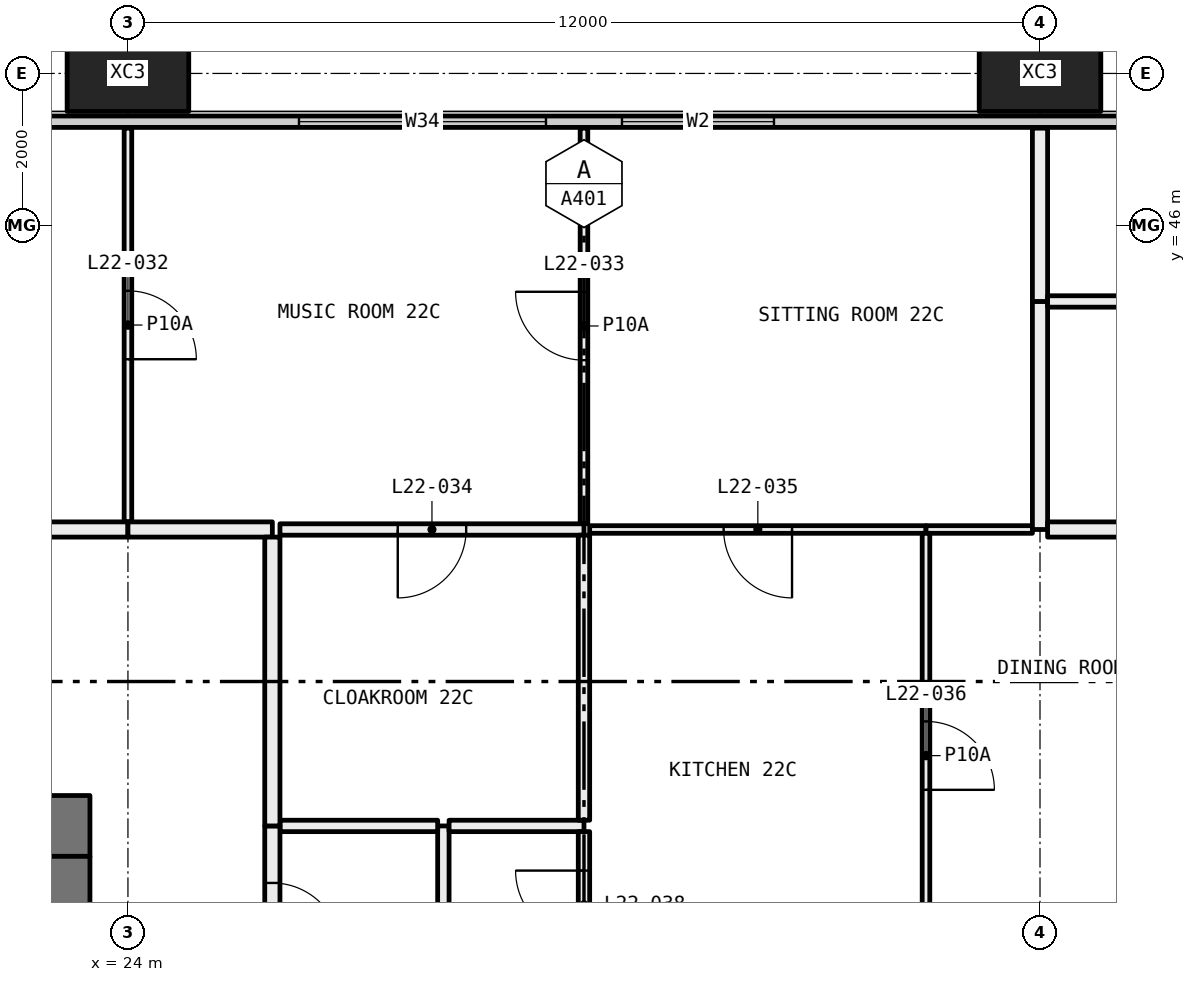
"""IFC4 building model, lengths in metres.
Left out: names, types, materials, properties, quantities, classifications, styles, units other than length and angle.
Written with IfcOpenShell. Run it as: python <this file> out.ifc"""

import sys

from ifc_helpers import new_model, si_unit, direction, frame, frame_2d, origin, origin_2d, place, context, subcontext, project, spatial, rectangle, hollow_rectangle, extrude, element, fill, save


model = new_model("IFC4")
c1 = context("Model", 3, precision=1e-05, world=origin(), true_north=direction((0.0, 1.0)))
c2 = subcontext(c1, "Body", "Model", "MODEL_VIEW")
j1 = project(units=[si_unit("LENGTHUNIT", "METRE"), si_unit("PLANEANGLEUNIT", "RADIAN")], contexts=[c1])
p1 = place(None, origin())
s1 = spatial("IfcSite", under=j1, at=p1, CompositionType="ELEMENT")
p2 = place(p1, origin())
s2 = spatial("IfcBuilding", under=s1, at=p2, CompositionType="ELEMENT")
p3 = place(p2, frame((0.0, 0.0, 88.65)))
s3 = spatial("IfcBuildingStorey", under=s2, at=p3, CompositionType="ELEMENT", Elevation=88.65)
for number, where, z_axis, x_axis in (
    (1, (24.0, 48.0, -0.4), (0.0, 0.0, 1.0), (1.0, 0.0, 0.0)),
    (2, (36.0, 48.0, -0.4), (0.0, 0.0, 1.0), (1.0, 0.0, 0.0)),
):
    element("IfcColumn", number, at=place(p3, frame(where, z_axis=z_axis, x_axis=x_axis)), inside=s3, PredefinedType="COLUMN", context=c2, shape_type="SweptSolid", body=[
        extrude(hollow_rectangle(XDim=1.6, YDim=1.0, WallThickness=0.065, at=origin_2d()), origin(), (0.0, 0.0, 1.0), 3.45),
    ])
p4 = place(p3, frame((6.56, 47.365, 0.0), z_axis=(0.0, 0.0, 1.0), x_axis=(1.0, 0.0, 0.0)))
e3 = element("IfcWall", 3, at=p4, inside=s3, PredefinedType="ELEMENTEDWALL", context=c2, shape_type="SweptSolid", body=[
    extrude(rectangle(XDim=58.88, YDim=0.15, at=frame_2d((29.44, 0.0))), origin(), (0.0, 0.0, 1.0), 3.05),
])
p5 = place(p4, frame((0.44, 0.0, 0.45)))
e4 = element("IfcOpeningElement", 4, at=p5, cuts=e3, PredefinedType="OPENING", context=c2, shape_type="SweptSolid", body=[
    extrude(rectangle(XDim=4.5, YDim=2.55, at=frame_2d((2.25, 1.275))), frame((0.0, 0.085, 0.0), z_axis=(0.0, -1.0, 0.0), x_axis=(1.0, 0.0, 0.0)), (0.0, 0.0, 1.0), 0.17),
])
p6 = place(p4, frame((7.69, 0.0, 0.45)))
e5 = element("IfcOpeningElement", 5, at=p6, cuts=e3, PredefinedType="OPENING", context=c2, shape_type="SweptSolid", body=[
    extrude(rectangle(XDim=3.25, YDim=2.55, at=frame_2d((1.625, 1.275))), frame((0.0, 0.085, 0.0), z_axis=(0.0, -1.0, 0.0), x_axis=(1.0, 0.0, 0.0)), (0.0, 0.0, 1.0), 0.17),
])
p7 = place(p4, frame((11.94, 0.0, 0.45)))
e6 = element("IfcOpeningElement", 6, at=p7, cuts=e3, PredefinedType="OPENING", context=c2, shape_type="SweptSolid", body=[
    extrude(rectangle(XDim=3.25, YDim=2.55, at=frame_2d((1.625, 1.275))), frame((0.0, 0.085, 0.0), z_axis=(0.0, -1.0, 0.0), x_axis=(1.0, 0.0, 0.0)), (0.0, 0.0, 1.0), 0.17),
])
p8 = place(p4, frame((19.69, 0.0, 0.45)))
e7 = element("IfcOpeningElement", 7, at=p8, cuts=e3, PredefinedType="OPENING", context=c2, shape_type="SweptSolid", body=[
    extrude(rectangle(XDim=3.25, YDim=2.55, at=frame_2d((1.625, 1.275))), frame((0.0, 0.085, 0.0), z_axis=(0.0, -1.0, 0.0), x_axis=(1.0, 0.0, 0.0)), (0.0, 0.0, 1.0), 0.17),
])
p9 = place(p4, frame((23.94, 0.0, 0.45)))
e8 = element("IfcOpeningElement", 8, at=p9, cuts=e3, PredefinedType="OPENING", context=c2, shape_type="SweptSolid", body=[
    extrude(rectangle(XDim=2.0, YDim=2.55, at=frame_2d((1.0, 1.275))), frame((0.0, 0.085, 0.0), z_axis=(0.0, -1.0, 0.0), x_axis=(1.0, 0.0, 0.0)), (0.0, 0.0, 1.0), 0.17),
])
p10 = place(p4, frame((31.69, 0.0, 0.45)))
e9 = element("IfcOpeningElement", 9, at=p10, cuts=e3, PredefinedType="OPENING", context=c2, shape_type="SweptSolid", body=[
    extrude(rectangle(XDim=3.25, YDim=2.55, at=frame_2d((1.625, 1.275))), frame((0.0, 0.085, 0.0), z_axis=(0.0, -1.0, 0.0), x_axis=(1.0, 0.0, 0.0)), (0.0, 0.0, 1.0), 0.17),
])
p11 = place(p4, frame((35.94, 0.0, 0.45)))
e10 = element("IfcOpeningElement", 10, at=p11, cuts=e3, PredefinedType="OPENING", context=c2, shape_type="SweptSolid", body=[
    extrude(rectangle(XDim=3.25, YDim=2.55, at=frame_2d((1.625, 1.275))), frame((0.0, 0.085, 0.0), z_axis=(0.0, -1.0, 0.0), x_axis=(1.0, 0.0, 0.0)), (0.0, 0.0, 1.0), 0.17),
])
p12 = place(p4, frame((43.69, 0.0, 0.45)))
e11 = element("IfcOpeningElement", 11, at=p12, cuts=e3, PredefinedType="OPENING", context=c2, shape_type="SweptSolid", body=[
    extrude(rectangle(XDim=3.25, YDim=2.55, at=frame_2d((1.625, 1.275))), frame((0.0, 0.085, 0.0), z_axis=(0.0, -1.0, 0.0), x_axis=(1.0, 0.0, 0.0)), (0.0, 0.0, 1.0), 0.17),
])
p13 = place(p4, frame((47.94, 0.0, 0.45)))
e12 = element("IfcOpeningElement", 12, at=p13, cuts=e3, PredefinedType="OPENING", context=c2, shape_type="SweptSolid", body=[
    extrude(rectangle(XDim=2.0, YDim=2.55, at=frame_2d((1.0, 1.275))), frame((0.0, 0.085, 0.0), z_axis=(0.0, -1.0, 0.0), x_axis=(1.0, 0.0, 0.0)), (0.0, 0.0, 1.0), 0.17),
])
p14 = place(p4, frame((53.94, 0.0, 0.45)))
e13 = element("IfcOpeningElement", 13, at=p14, cuts=e3, PredefinedType="OPENING", context=c2, shape_type="SweptSolid", body=[
    extrude(rectangle(XDim=4.5, YDim=2.55, at=frame_2d((2.25, 1.275))), frame((0.0, 0.085, 0.0), z_axis=(0.0, -1.0, 0.0), x_axis=(1.0, 0.0, 0.0)), (0.0, 0.0, 1.0), 0.17),
])
p15 = place(p3, frame((24.0, 42.1, 0.0), z_axis=(0.0, 0.0, 1.0), x_axis=(0.0, 1.0, 0.0)))
e14 = element("IfcWall", 14, at=p15, inside=s3, PredefinedType="PARTITIONING", context=c2, shape_type="SweptSolid", body=[
    extrude(rectangle(XDim=5.18, YDim=0.1, at=frame_2d((2.59, 0.0))), origin(), (0.0, 0.0, 1.0), 3.05),
])
p16 = place(p15, frame((2.14, 0.0, 0.0)))
e15 = element("IfcOpeningElement", 15, at=p16, cuts=e14, PredefinedType="OPENING", context=c2, shape_type="SweptSolid", body=[
    extrude(rectangle(XDim=0.9, YDim=2.1, at=frame_2d((0.45, 1.05))), frame((0.0, 0.06, 0.0), z_axis=(0.0, -1.0, 0.0), x_axis=(1.0, 0.0, 0.0)), (0.0, 0.0, 1.0), 0.12),
])
p17 = place(p3, frame((18.0, 42.0, 0.0), z_axis=(0.0, 0.0, 1.0), x_axis=(1.0, 0.0, 0.0)))
e16 = element("IfcWall", 16, at=p17, inside=s3, PredefinedType="PARTITIONING", context=c2, shape_type="SweptSolid", body=[
    extrude(rectangle(XDim=6.0, YDim=0.2, at=frame_2d((3.0, 0.0))), origin(), (0.0, 0.0, 1.0), 3.05),
])
p18 = place(p17, frame((2.5, 0.0, 0.0)))
e17 = element("IfcOpeningElement", 17, at=p18, cuts=e16, PredefinedType="OPENING", context=c2, shape_type="SweptSolid", body=[
    extrude(rectangle(XDim=1.0, YDim=2.1, at=frame_2d((0.5, 1.05))), frame((0.0, 0.11, 0.0), z_axis=(0.0, -1.0, 0.0), x_axis=(1.0, 0.0, 0.0)), (0.0, 0.0, 1.0), 0.22),
])
p19 = place(p3, frame((30.0, 42.075, 0.0), z_axis=(0.0, 0.0, 1.0), x_axis=(0.0, 1.0, 0.0)))
e18 = element("IfcWall", 18, at=p19, inside=s3, PredefinedType="PARTITIONING", context=c2, shape_type="SweptSolid", body=[
    extrude(rectangle(XDim=5.205, YDim=0.1, at=frame_2d((2.603, 0.0))), origin(), (0.0, 0.0, 1.0), 3.05),
])
p20 = place(p19, frame((2.153, 0.0, 0.0)))
e19 = element("IfcOpeningElement", 19, at=p20, cuts=e18, PredefinedType="OPENING", context=c2, shape_type="SweptSolid", body=[
    extrude(rectangle(XDim=0.9, YDim=2.1, at=frame_2d((0.45, 1.05))), frame((0.0, 0.06, 0.0), z_axis=(0.0, -1.0, 0.0), x_axis=(1.0, 0.0, 0.0)), (0.0, 0.0, 1.0), 0.12),
])
p21 = place(p3, frame((26.0, 42.0, 0.0), z_axis=(0.0, 0.0, 1.0), x_axis=(1.0, 0.0, 0.0)))
e20 = element("IfcWall", 20, at=p21, inside=s3, PredefinedType="PARTITIONING", context=c2, shape_type="SweptSolid", body=[
    extrude(rectangle(XDim=4.0, YDim=0.15, at=frame_2d((2.0, 0.0))), origin(), (0.0, 0.0, 1.0), 3.05),
])
p22 = place(p21, frame((1.55, 0.0, 0.0)))
e21 = element("IfcOpeningElement", 21, at=p22, cuts=e20, PredefinedType="OPENING", context=c2, shape_type="SweptSolid", body=[
    extrude(rectangle(XDim=0.9, YDim=2.1, at=frame_2d((0.45, 1.05))), frame((0.0, 0.085, 0.0), z_axis=(0.0, -1.0, 0.0), x_axis=(1.0, 0.0, 0.0)), (0.0, 0.0, 1.0), 0.17),
])
p23 = place(p3, frame((24.0, 42.0, 0.0), z_axis=(0.0, 0.0, 1.0), x_axis=(1.0, 0.0, 0.0)))
e22 = element("IfcWall", 22, at=p23, inside=s3, PredefinedType="PARTITIONING", context=c2, shape_type="SweptSolid", body=[
    extrude(rectangle(XDim=1.9, YDim=0.2, at=frame_2d((0.95, 0.0))), origin(), (0.0, 0.0, 1.0), 3.05),
])
p24 = place(p3, frame((30.075, 42.0, 0.0), z_axis=(0.0, 0.0, 1.0), x_axis=(1.0, 0.0, 0.0)))
e23 = element("IfcWall", 23, at=p24, inside=s3, PredefinedType="PARTITIONING", context=c2, shape_type="SweptSolid", body=[
    extrude(rectangle(XDim=4.425, YDim=0.1, at=frame_2d((2.212, 0.0))), origin(), (0.0, 0.0, 1.0), 3.05),
])
p25 = place(p24, frame((1.762, 0.0, 0.0)))
e24 = element("IfcOpeningElement", 24, at=p25, cuts=e23, PredefinedType="OPENING", context=c2, shape_type="SweptSolid", body=[
    extrude(rectangle(XDim=0.9, YDim=2.1, at=frame_2d((0.45, 1.05))), frame((0.0, 0.06, 0.0), z_axis=(0.0, -1.0, 0.0), x_axis=(1.0, 0.0, 0.0)), (0.0, 0.0, 1.0), 0.12),
])
p26 = place(p3, frame((34.5, 42.0, 0.0), z_axis=(0.0, 0.0, 1.0), x_axis=(1.0, 0.0, 0.0)))
e25 = element("IfcWall", 25, at=p26, inside=s3, PredefinedType="PARTITIONING", context=c2, shape_type="SweptSolid", body=[
    extrude(rectangle(XDim=1.4, YDim=0.1, at=frame_2d((0.7, 0.0))), origin(), (0.0, 0.0, 1.0), 3.05),
])
p27 = place(p3, frame((36.0, 42.0, 0.0), z_axis=(0.0, 0.0, 1.0), x_axis=(0.0, 1.0, 0.0)))
e26 = element("IfcWall", 26, at=p27, inside=s3, PredefinedType="PARTITIONING", context=c2, shape_type="SweptSolid", body=[
    extrude(rectangle(XDim=3.0, YDim=0.2, at=frame_2d((1.5, 0.0))), origin(), (0.0, 0.0, 1.0), 2.45),
])
p28 = place(p3, frame((36.0, 45.0, 0.0), z_axis=(0.0, 0.0, 1.0), x_axis=(0.0, 1.0, 0.0)))
e27 = element("IfcWall", 27, at=p28, inside=s3, PredefinedType="PARTITIONING", context=c2, shape_type="SweptSolid", body=[
    extrude(rectangle(XDim=2.28, YDim=0.2, at=frame_2d((1.14, 0.0))), origin(), (0.0, 0.0, 1.0), 2.45),
])
p29 = place(p3, frame((28.15, 36.1, 0.0), z_axis=(0.0, 0.0, 1.0), x_axis=(0.0, 1.0, 0.0)))
e28 = element("IfcWall", 28, at=p29, inside=s3, PredefinedType="PARTITIONING", context=c2, shape_type="SweptSolid", body=[
    extrude(rectangle(XDim=2.0, YDim=0.15, at=frame_2d((1.0, 0.0))), origin(), (0.0, 0.0, 1.0), 3.05),
])
p30 = place(p3, frame((28.075, 38.1, 0.0), z_axis=(0.0, 0.0, 1.0), x_axis=(-1.0, 0.0, 0.0)))
e29 = element("IfcWall", 29, at=p30, inside=s3, PredefinedType="PARTITIONING", context=c2, shape_type="SweptSolid", body=[
    extrude(rectangle(XDim=2.075, YDim=0.15, at=frame_2d((1.038, 0.0))), origin(), (0.0, 0.0, 1.0), 3.05),
])
p31 = place(p3, frame((25.9, 38.1, 0.0), z_axis=(0.0, 0.0, 1.0), x_axis=(0.0, -1.0, 0.0)))
e30 = element("IfcWall", 30, at=p31, inside=s3, PredefinedType="PARTITIONING", context=c2, shape_type="SweptSolid", body=[
    extrude(rectangle(XDim=2.4, YDim=0.2, at=frame_2d((1.2, 0.0))), origin(), (0.0, 0.0, 1.0), 2.45),
])
p32 = place(p31, frame((0.75, 0.0, 0.0)))
e31 = element("IfcOpeningElement", 31, at=p32, cuts=e30, PredefinedType="OPENING", context=c2, shape_type="SweptSolid", body=[
    extrude(rectangle(XDim=0.9, YDim=2.1, at=frame_2d((0.45, 1.05))), frame((0.0, 0.11, 0.0), z_axis=(0.0, -1.0, 0.0), x_axis=(1.0, 0.0, 0.0)), (0.0, 0.0, 1.0), 0.22),
])
p33 = place(p3, frame((30.0, 38.1, 0.0), z_axis=(0.0, 0.0, 1.0), x_axis=(-1.0, 0.0, 0.0)))
e32 = element("IfcWall", 32, at=p33, inside=s3, PredefinedType="PARTITIONING", context=c2, shape_type="SweptSolid", body=[
    extrude(rectangle(XDim=1.775, YDim=0.15, at=frame_2d((0.887, 0.0))), origin(), (0.0, 0.0, 1.0), 3.05),
])
p34 = place(p3, frame((30.0, 36.1, 0.0), z_axis=(0.0, 0.0, 1.0), x_axis=(0.0, 1.0, 0.0)))
e33 = element("IfcWall", 33, at=p34, inside=s3, PredefinedType="PARTITIONING", context=c2, shape_type="SweptSolid", body=[
    extrude(rectangle(XDim=1.925, YDim=0.15, at=frame_2d((0.962, 0.0))), origin(), (0.0, 0.0, 1.0), 3.05),
])
p35 = place(p34, frame((0.512, 0.0, 0.0)))
e34 = element("IfcOpeningElement", 34, at=p35, cuts=e33, PredefinedType="OPENING", context=c2, shape_type="SweptSolid", body=[
    extrude(rectangle(XDim=0.9, YDim=2.1, at=frame_2d((0.45, 1.05))), frame((0.0, 0.085, 0.0), z_axis=(0.0, -1.0, 0.0), x_axis=(1.0, 0.0, 0.0)), (0.0, 0.0, 1.0), 0.17),
])
p36 = place(p3, frame((30.0, 38.175, 0.0), z_axis=(0.0, 0.0, 1.0), x_axis=(0.0, 1.0, 0.0)))
e35 = element("IfcWall", 35, at=p36, inside=s3, PredefinedType="PARTITIONING", context=c2, shape_type="SweptSolid", body=[
    extrude(rectangle(XDim=3.75, YDim=0.15, at=frame_2d((1.875, 0.0))), origin(), (0.0, 0.0, 1.0), 3.05),
])
p37 = place(p3, frame((25.9, 41.9, 0.0), z_axis=(0.0, 0.0, 1.0), x_axis=(0.0, -1.0, 0.0)))
e36 = element("IfcWall", 36, at=p37, inside=s3, PredefinedType="PARTITIONING", context=c2, shape_type="SweptSolid", body=[
    extrude(rectangle(XDim=3.8, YDim=0.2, at=frame_2d((1.9, 0.0))), origin(), (0.0, 0.0, 1.0), 3.05),
])
p38 = place(p3, frame((34.5, 36.1, 0.0), z_axis=(0.0, 0.0, 1.0), x_axis=(0.0, 1.0, 0.0)))
e37 = element("IfcWall", 37, at=p38, inside=s3, PredefinedType="PARTITIONING", context=c2, shape_type="SweptSolid", body=[
    extrude(rectangle(XDim=5.85, YDim=0.1, at=frame_2d((2.925, 0.0))), origin(), (0.0, 0.0, 1.0), 3.05),
])
p39 = place(p38, frame((2.475, 0.0, 0.0)))
e38 = element("IfcOpeningElement", 38, at=p39, cuts=e37, PredefinedType="OPENING", context=c2, shape_type="SweptSolid", body=[
    extrude(rectangle(XDim=0.9, YDim=2.1, at=frame_2d((0.45, 1.05))), frame((0.0, 0.06, 0.0), z_axis=(0.0, -1.0, 0.0), x_axis=(1.0, 0.0, 0.0)), (0.0, 0.0, 1.0), 0.12),
])
p40 = place(p3, frame((38.4, 42.0, 0.0), z_axis=(0.0, 0.0, 1.0), x_axis=(-1.0, 0.0, 0.0)))
e39 = element("IfcWall", 39, at=p40, inside=s3, PredefinedType="PARTITIONING", context=c2, shape_type="SweptSolid", body=[
    extrude(rectangle(XDim=2.3, YDim=0.2, at=frame_2d((1.15, 0.0))), origin(), (0.0, 0.0, 1.0), 3.05),
])
p41 = place(p3, frame((42.0, 45.0, 0.0), z_axis=(0.0, 0.0, 1.0), x_axis=(-1.0, 0.0, 0.0)))
e40 = element("IfcWall", 40, at=p41, inside=s3, PredefinedType="PARTITIONING", context=c2, shape_type="SweptSolid", body=[
    extrude(rectangle(XDim=5.9, YDim=0.15, at=frame_2d((2.95, 0.0))), origin(), (0.0, 0.0, 1.0), 3.05),
])
p42 = place(p3, frame((12.5, 38.1, 0.0), z_axis=(0.0, 0.0, 1.0), x_axis=(1.0, 0.0, 0.0)))
e41 = element("IfcWall", 41, at=p42, inside=s3, PredefinedType="SHEAR", context=c2, shape_type="SweptSolid", body=[
    extrude(rectangle(XDim=11.0, YDim=0.8, at=frame_2d((5.5, 0.0))), origin(), (0.0, 0.0, 1.0), 3.05),
])
p43 = place(p42, frame((8.4, 0.0, 0.0)))
e42 = element("IfcOpeningElement", 42, at=p43, cuts=e41, PredefinedType="OPENING", context=c2, shape_type="SweptSolid", body=[
    extrude(rectangle(XDim=1.6, YDim=2.1, at=frame_2d((0.8, 1.05))), frame((0.0, 0.41, 0.0), z_axis=(0.0, -1.0, 0.0), x_axis=(1.0, 0.0, 0.0)), (0.0, 0.0, 1.0), 0.82),
])
p44 = place(p3, frame((23.1, 22.3, 0.0), z_axis=(0.0, 0.0, 1.0), x_axis=(0.0, 1.0, 0.0)))
e43 = element("IfcWall", 43, at=p44, inside=s3, PredefinedType="SHEAR", context=c2, shape_type="SweptSolid", body=[
    extrude(rectangle(XDim=15.4, YDim=0.8, at=frame_2d((7.7, 0.0))), origin(), (0.0, 0.0, 1.0), 3.05),
])
p45 = place(p44, frame((6.9, 0.0, 0.0)))
e44 = element("IfcOpeningElement", 44, at=p45, cuts=e43, PredefinedType="OPENING", context=c2, shape_type="SweptSolid", body=[
    extrude(rectangle(XDim=1.6, YDim=2.1, at=frame_2d((0.8, 1.05))), frame((0.0, 0.41, 0.0), z_axis=(0.0, -1.0, 0.0), x_axis=(1.0, 0.0, 0.0)), (0.0, 0.0, 1.0), 0.82),
])
p46 = place(p8, origin())
e45 = element("IfcWindow", 45, at=p46, inside=s3, PartitioningType="SINGLE_PANEL", PredefinedType="WINDOW", context=c2, shape_type="SweptSolid", body=[
    extrude(rectangle(XDim=3.25, YDim=2.55, at=frame_2d((1.625, 1.275))), frame((0.0, 0.03, 0.0), z_axis=(0.0, -1.0, 0.0), x_axis=(1.0, 0.0, 0.0)), (0.0, 0.0, 1.0), 0.06),
])
fill(e7, e45)
p47 = place(p9, origin())
e46 = element("IfcWindow", 46, at=p47, inside=s3, PartitioningType="SINGLE_PANEL", PredefinedType="WINDOW", context=c2, shape_type="SweptSolid", body=[
    extrude(rectangle(XDim=2.0, YDim=2.55, at=frame_2d((1.0, 1.275))), frame((0.0, 0.03, 0.0), z_axis=(0.0, -1.0, 0.0), x_axis=(1.0, 0.0, 0.0)), (0.0, 0.0, 1.0), 0.06),
])
fill(e8, e46)
p48 = place(p16, frame((0.9, 0.0, 0.0), x_axis=(-1.0, 0.0, 0.0)))
e47 = element("IfcDoor", 47, at=p48, inside=s3, OperationType="SINGLE_SWING_LEFT", PredefinedType="DOOR", context=c2, shape_type="SweptSolid", body=[
    extrude(rectangle(XDim=0.9, YDim=2.1, at=frame_2d((0.45, 1.05))), frame((0.0, 0.025, 0.0), z_axis=(0.0, -1.0, 0.0), x_axis=(1.0, 0.0, 0.0)), (0.0, 0.0, 1.0), 0.05),
])
fill(e15, e47)
p49 = place(p20, origin())
e48 = element("IfcDoor", 48, at=p49, inside=s3, OperationType="SINGLE_SWING_LEFT", PredefinedType="DOOR", context=c2, shape_type="SweptSolid", body=[
    extrude(rectangle(XDim=0.9, YDim=2.1, at=frame_2d((0.45, 1.05))), frame((0.0, 0.025, 0.0), z_axis=(0.0, -1.0, 0.0), x_axis=(1.0, 0.0, 0.0)), (0.0, 0.0, 1.0), 0.05),
])
fill(e19, e48)
p50 = place(p22, frame((0.9, 0.0, 0.0), x_axis=(-1.0, 0.0, 0.0)))
e49 = element("IfcDoor", 49, at=p50, inside=s3, OperationType="SINGLE_SWING_LEFT", PredefinedType="DOOR", context=c2, shape_type="SweptSolid", body=[
    extrude(rectangle(XDim=0.9, YDim=2.1, at=frame_2d((0.45, 1.05))), frame((0.0, 0.025, 0.0), z_axis=(0.0, -1.0, 0.0), x_axis=(1.0, 0.0, 0.0)), (0.0, 0.0, 1.0), 0.05),
])
fill(e21, e49)
p51 = place(p25, frame((0.9, 0.0, 0.0), x_axis=(-1.0, 0.0, 0.0)))
e50 = element("IfcDoor", 50, at=p51, inside=s3, OperationType="SINGLE_SWING_RIGHT", PredefinedType="DOOR", context=c2, shape_type="SweptSolid", body=[
    extrude(rectangle(XDim=0.9, YDim=2.1, at=frame_2d((0.45, 1.05))), frame((0.0, 0.025, 0.0), z_axis=(0.0, -1.0, 0.0), x_axis=(1.0, 0.0, 0.0)), (0.0, 0.0, 1.0), 0.05),
])
fill(e24, e50)
p52 = place(p39, frame((0.9, 0.0, 0.0), x_axis=(-1.0, 0.0, 0.0)))
e51 = element("IfcDoor", 51, at=p52, inside=s3, OperationType="SINGLE_SWING_LEFT", PredefinedType="DOOR", context=c2, shape_type="SweptSolid", body=[
    extrude(rectangle(XDim=0.9, YDim=2.1, at=frame_2d((0.45, 1.05))), frame((0.0, 0.025, 0.0), z_axis=(0.0, -1.0, 0.0), x_axis=(1.0, 0.0, 0.0)), (0.0, 0.0, 1.0), 0.05),
])
fill(e38, e51)
p53 = place(p35, origin())
e52 = element("IfcDoor", 52, at=p53, inside=s3, OperationType="SINGLE_SWING_LEFT", PredefinedType="DOOR", context=c2, shape_type="SweptSolid", body=[
    extrude(rectangle(XDim=0.9, YDim=2.1, at=frame_2d((0.45, 1.05))), frame((0.0, 0.025, 0.0), z_axis=(0.0, -1.0, 0.0), x_axis=(1.0, 0.0, 0.0)), (0.0, 0.0, 1.0), 0.05),
])
fill(e34, e52)
p54 = place(p32, origin())
e53 = element("IfcDoor", 53, at=p54, inside=s3, OperationType="SINGLE_SWING_LEFT", PredefinedType="DOOR", context=c2, shape_type="SweptSolid", body=[
    extrude(rectangle(XDim=0.9, YDim=2.1, at=frame_2d((0.45, 1.05))), frame((0.0, 0.025, 0.0), z_axis=(0.0, -1.0, 0.0), x_axis=(1.0, 0.0, 0.0)), (0.0, 0.0, 1.0), 0.05),
])
fill(e31, e53)
save(model, sys.argv[1])
